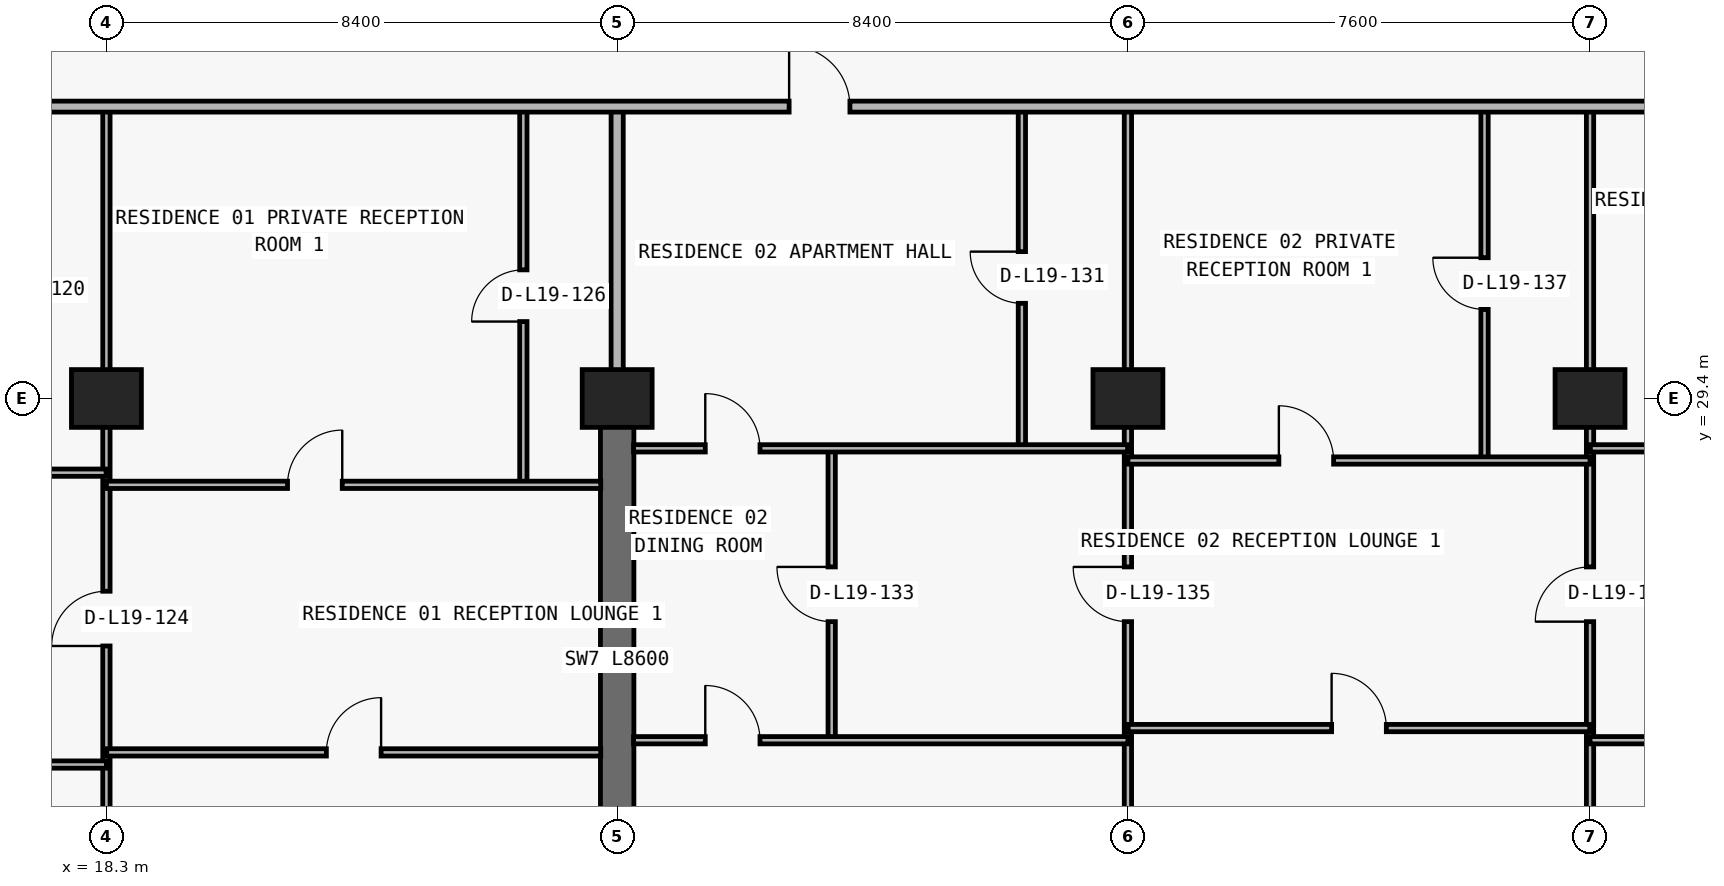
"""IFC4 building model, lengths in metres.
Left out: names, types, materials, properties, quantities, classifications, styles, units other than length and angle.
Written with IfcOpenShell. Run it as: python <this file> out.ifc"""

import sys

from ifc_helpers import new_model, si_unit, direction, frame, frame_2d, origin, origin_2d, place, context, subcontext, project, spatial, rectangle, extrude, element, fill, save


model = new_model("IFC4")
c1 = context("Model", 3, precision=1e-05, world=origin(), true_north=direction((0.0, 1.0)))
c2 = subcontext(c1, "Body", "Model", "MODEL_VIEW")
j1 = project(units=[si_unit("LENGTHUNIT", "METRE"), si_unit("PLANEANGLEUNIT", "RADIAN")], contexts=[c1])
p1 = place(None, origin())
s1 = spatial("IfcSite", under=j1, at=p1, CompositionType="ELEMENT")
p2 = place(p1, origin())
s2 = spatial("IfcBuilding", under=s1, at=p2, CompositionType="ELEMENT")
p3 = place(p2, frame((0.0, 0.0, 72.9)))
s3 = spatial("IfcBuildingStorey", under=s2, at=p3, CompositionType="ELEMENT", Elevation=72.9)
for number, where, z_axis, x_axis in (
    (1, (18.3, 29.4, 0.0), (0.0, 0.0, 1.0), (1.0, 0.0, 0.0)),
    (2, (26.7, 29.4, 0.0), (0.0, 0.0, 1.0), (1.0, 0.0, 0.0)),
    (3, (35.1, 29.4, 0.0), (0.0, 0.0, 1.0), (1.0, 0.0, 0.0)),
    (4, (42.7, 29.4, 0.0), (0.0, 0.0, 1.0), (1.0, 0.0, 0.0)),
):
    element("IfcColumn", number, at=place(p3, frame(where, z_axis=z_axis, x_axis=x_axis)), inside=s3, PredefinedType="COLUMN", context=c2, shape_type="SweptSolid", body=[
        extrude(rectangle(XDim=1.15, YDim=0.95, at=origin_2d()), origin(), (0.0, 0.0, 1.0), 3.05),
    ])
p4 = place(p3, frame((26.7, 20.8, 0.0), z_axis=(0.0, 0.0, 1.0), x_axis=(0.0, 1.0, 0.0)))
e5 = element("IfcWall", 5, at=p4, inside=s3, PredefinedType="SHEAR", context=c2, shape_type="SweptSolid", body=[
    extrude(rectangle(XDim=8.6, YDim=0.55, at=frame_2d((4.3, 0.0))), origin(), (0.0, 0.0, 1.0), 3.05),
])
p5 = place(p3, frame((18.3, 6.24, 0.0), z_axis=(0.0, 0.0, 1.0), x_axis=(0.0, 1.0, 0.0)))
e6 = element("IfcWall", 6, at=p5, inside=s3, PredefinedType="PARTITIONING", context=c2, shape_type="SweptSolid", body=[
    extrude(rectangle(XDim=27.96, YDim=0.12, at=frame_2d((13.98, 0.0))), origin(), (0.0, 0.0, 1.0), 2.11),
])
p6 = place(p5, frame((19.09, 0.0, 0.0)))
e7 = element("IfcOpeningElement", 7, at=p6, cuts=e6, PredefinedType="OPENING", context=c2, shape_type="SweptSolid", body=[
    extrude(rectangle(XDim=0.9, YDim=2.06, at=frame_2d((0.45, 1.03))), frame((0.0, 0.07, 0.0), z_axis=(0.0, -1.0, 0.0), x_axis=(1.0, 0.0, 0.0)), (0.0, 0.0, 1.0), 0.14),
])
p7 = place(p3, frame((25.157, 27.98, 0.0), z_axis=(0.0, 0.0, 1.0), x_axis=(0.0, 1.0, 0.0)))
e8 = element("IfcWall", 8, at=p7, inside=s3, PredefinedType="PARTITIONING", context=c2, shape_type="SweptSolid", body=[
    extrude(rectangle(XDim=6.22, YDim=0.12, at=frame_2d((3.11, 0.0))), origin(), (0.0, 0.0, 1.0), 3.05),
])
p8 = place(p7, frame((2.685, 0.0, 0.0)))
e9 = element("IfcOpeningElement", 9, at=p8, cuts=e8, PredefinedType="OPENING", context=c2, shape_type="SweptSolid", body=[
    extrude(rectangle(XDim=0.85, YDim=2.1, at=frame_2d((0.425, 1.05))), frame((0.0, 0.07, 0.0), z_axis=(0.0, -1.0, 0.0), x_axis=(1.0, 0.0, 0.0)), (0.0, 0.0, 1.0), 0.14),
])
p9 = place(p3, frame((26.7, 29.405, 0.0), z_axis=(0.0, 0.0, 1.0), x_axis=(0.0, 1.0, 0.0)))
e10 = element("IfcWall", 10, at=p9, inside=s3, PredefinedType="PARTITIONING", context=c2, shape_type="SweptSolid", body=[
    extrude(rectangle(XDim=4.795, YDim=0.2, at=frame_2d((2.397, 0.0))), origin(), (0.0, 0.0, 1.0), 2.335),
])
p10 = place(p3, frame((30.228, 23.78, 0.0), z_axis=(0.0, 0.0, 1.0), x_axis=(0.0, 1.0, 0.0)))
e11 = element("IfcWall", 11, at=p10, inside=s3, PredefinedType="PARTITIONING", context=c2, shape_type="SweptSolid", body=[
    extrude(rectangle(XDim=4.8, YDim=0.12, at=frame_2d((2.4, 0.0))), origin(), (0.0, 0.0, 1.0), 3.05),
])
p11 = place(p10, frame((1.95, 0.0, 0.0)))
e12 = element("IfcOpeningElement", 12, at=p11, cuts=e11, PredefinedType="OPENING", context=c2, shape_type="SweptSolid", body=[
    extrude(rectangle(XDim=0.9, YDim=2.15, at=frame_2d((0.45, 1.075))), frame((0.0, 0.07, 0.0), z_axis=(0.0, -1.0, 0.0), x_axis=(1.0, 0.0, 0.0)), (0.0, 0.0, 1.0), 0.14),
])
p12 = place(p3, frame((33.356, 28.58, 0.0), z_axis=(0.0, 0.0, 1.0), x_axis=(0.0, 1.0, 0.0)))
e13 = element("IfcWall", 13, at=p12, inside=s3, PredefinedType="PARTITIONING", context=c2, shape_type="SweptSolid", body=[
    extrude(rectangle(XDim=5.62, YDim=0.12, at=frame_2d((2.81, 0.0))), origin(), (0.0, 0.0, 1.0), 3.05),
])
p13 = place(p12, frame((2.385, 0.0, 0.0)))
e14 = element("IfcOpeningElement", 14, at=p13, cuts=e13, PredefinedType="OPENING", context=c2, shape_type="SweptSolid", body=[
    extrude(rectangle(XDim=0.85, YDim=2.1, at=frame_2d((0.425, 1.05))), frame((0.0, 0.07, 0.0), z_axis=(0.0, -1.0, 0.0), x_axis=(1.0, 0.0, 0.0)), (0.0, 0.0, 1.0), 0.14),
])
p14 = place(p3, frame((35.1, 6.24, 0.0), z_axis=(0.0, 0.0, 1.0), x_axis=(0.0, 1.0, 0.0)))
e15 = element("IfcWall", 15, at=p14, inside=s3, PredefinedType="PARTITIONING", context=c2, shape_type="SweptSolid", body=[
    extrude(rectangle(XDim=27.96, YDim=0.12, at=frame_2d((13.98, 0.0))), origin(), (0.0, 0.0, 1.0), 2.11),
])
p15 = place(p14, frame((19.49, 0.0, 0.0)))
e16 = element("IfcOpeningElement", 16, at=p15, cuts=e15, PredefinedType="OPENING", context=c2, shape_type="SweptSolid", body=[
    extrude(rectangle(XDim=0.9, YDim=2.06, at=frame_2d((0.45, 1.03))), frame((0.0, 0.07, 0.0), z_axis=(0.0, -1.0, 0.0), x_axis=(1.0, 0.0, 0.0)), (0.0, 0.0, 1.0), 0.14),
])
p16 = place(p3, frame((40.965, 28.38, 0.0), z_axis=(0.0, 0.0, 1.0), x_axis=(0.0, 1.0, 0.0)))
e17 = element("IfcWall", 17, at=p16, inside=s3, PredefinedType="PARTITIONING", context=c2, shape_type="SweptSolid", body=[
    extrude(rectangle(XDim=5.82, YDim=0.12, at=frame_2d((2.91, 0.0))), origin(), (0.0, 0.0, 1.0), 3.05),
])
p17 = place(p16, frame((2.485, 0.0, 0.0)))
e18 = element("IfcOpeningElement", 18, at=p17, cuts=e17, PredefinedType="OPENING", context=c2, shape_type="SweptSolid", body=[
    extrude(rectangle(XDim=0.85, YDim=2.1, at=frame_2d((0.425, 1.05))), frame((0.0, 0.07, 0.0), z_axis=(0.0, -1.0, 0.0), x_axis=(1.0, 0.0, 0.0)), (0.0, 0.0, 1.0), 0.14),
])
p18 = place(p3, frame((42.7, 6.24, 0.0), z_axis=(0.0, 0.0, 1.0), x_axis=(0.0, 1.0, 0.0)))
e19 = element("IfcWall", 19, at=p18, inside=s3, PredefinedType="PARTITIONING", context=c2, shape_type="SweptSolid", body=[
    extrude(rectangle(XDim=27.96, YDim=0.12, at=frame_2d((13.98, 0.0))), origin(), (0.0, 0.0, 1.0), 2.11),
])
p19 = place(p18, frame((19.49, 0.0, 0.0)))
e20 = element("IfcOpeningElement", 20, at=p19, cuts=e19, PredefinedType="OPENING", context=c2, shape_type="SweptSolid", body=[
    extrude(rectangle(XDim=0.9, YDim=2.06, at=frame_2d((0.45, 1.03))), frame((0.0, 0.07, 0.0), z_axis=(0.0, -1.0, 0.0), x_axis=(1.0, 0.0, 0.0)), (0.0, 0.0, 1.0), 0.14),
])
p20 = place(p3, frame((9.9, 23.38, 0.0), z_axis=(0.0, 0.0, 1.0), x_axis=(1.0, 0.0, 0.0)))
e21 = element("IfcWall", 21, at=p20, inside=s3, PredefinedType="PARTITIONING", context=c2, shape_type="SweptSolid", body=[
    extrude(rectangle(XDim=8.4, YDim=0.12, at=frame_2d((4.2, 0.0))), origin(), (0.0, 0.0, 1.0), 3.05),
])
p21 = place(p20, frame((1.44, 0.0, 0.0)))
e22 = element("IfcOpeningElement", 22, at=p21, cuts=e21, PredefinedType="OPENING", context=c2, shape_type="SweptSolid", body=[
    extrude(rectangle(XDim=0.9, YDim=2.15, at=frame_2d((0.45, 1.075))), frame((0.0, 0.07, 0.0), z_axis=(0.0, -1.0, 0.0), x_axis=(1.0, 0.0, 0.0)), (0.0, 0.0, 1.0), 0.14),
])
p22 = place(p3, frame((18.305, 23.58, 0.0), z_axis=(0.0, 0.0, 1.0), x_axis=(1.0, 0.0, 0.0)))
e23 = element("IfcWall", 23, at=p22, inside=s3, PredefinedType="PARTITIONING", context=c2, shape_type="SweptSolid", body=[
    extrude(rectangle(XDim=8.125, YDim=0.12, at=frame_2d((4.062, 0.0))), origin(), (0.0, 0.0, 1.0), 3.05),
])
p23 = place(p22, frame((3.613, 0.0, 0.0)))
e24 = element("IfcOpeningElement", 24, at=p23, cuts=e23, PredefinedType="OPENING", context=c2, shape_type="SweptSolid", body=[
    extrude(rectangle(XDim=0.9, YDim=2.15, at=frame_2d((0.45, 1.075))), frame((0.0, 0.07, 0.0), z_axis=(0.0, -1.0, 0.0), x_axis=(1.0, 0.0, 0.0)), (0.0, 0.0, 1.0), 0.14),
])
p24 = place(p3, frame((26.97, 23.78, 0.0), z_axis=(0.0, 0.0, 1.0), x_axis=(1.0, 0.0, 0.0)))
e25 = element("IfcWall", 25, at=p24, inside=s3, PredefinedType="PARTITIONING", context=c2, shape_type="SweptSolid", body=[
    extrude(rectangle(XDim=8.13, YDim=0.12, at=frame_2d((4.065, 0.0))), origin(), (0.0, 0.0, 1.0), 3.05),
])
p25 = place(p24, frame((1.179, 0.0, 0.0)))
e26 = element("IfcOpeningElement", 26, at=p25, cuts=e25, PredefinedType="OPENING", context=c2, shape_type="SweptSolid", body=[
    extrude(rectangle(XDim=0.9, YDim=2.15, at=frame_2d((0.45, 1.075))), frame((0.0, 0.07, 0.0), z_axis=(0.0, -1.0, 0.0), x_axis=(1.0, 0.0, 0.0)), (0.0, 0.0, 1.0), 0.14),
])
p26 = place(p3, frame((42.7, 23.78, 0.0), z_axis=(0.0, 0.0, 1.0), x_axis=(1.0, 0.0, 0.0)))
e27 = element("IfcWall", 27, at=p26, inside=s3, PredefinedType="PARTITIONING", context=c2, shape_type="SweptSolid", body=[
    extrude(rectangle(XDim=8.13, YDim=0.12, at=frame_2d((4.065, 0.0))), origin(), (0.0, 0.0, 1.0), 3.05),
])
p27 = place(p26, frame((3.615, 0.0, 0.0)))
e28 = element("IfcOpeningElement", 28, at=p27, cuts=e27, PredefinedType="OPENING", context=c2, shape_type="SweptSolid", body=[
    extrude(rectangle(XDim=0.9, YDim=2.15, at=frame_2d((0.45, 1.075))), frame((0.0, 0.07, 0.0), z_axis=(0.0, -1.0, 0.0), x_axis=(1.0, 0.0, 0.0)), (0.0, 0.0, 1.0), 0.14),
])
p28 = place(p3, frame((35.105, 23.98, 0.0), z_axis=(0.0, 0.0, 1.0), x_axis=(1.0, 0.0, 0.0)))
e29 = element("IfcWall", 29, at=p28, inside=s3, PredefinedType="PARTITIONING", context=c2, shape_type="SweptSolid", body=[
    extrude(rectangle(XDim=7.59, YDim=0.12, at=frame_2d((3.795, 0.0))), origin(), (0.0, 0.0, 1.0), 3.05),
])
p29 = place(p28, frame((3.345, 0.0, 0.0)))
e30 = element("IfcOpeningElement", 30, at=p29, cuts=e29, PredefinedType="OPENING", context=c2, shape_type="SweptSolid", body=[
    extrude(rectangle(XDim=0.9, YDim=2.15, at=frame_2d((0.45, 1.075))), frame((0.0, 0.07, 0.0), z_axis=(0.0, -1.0, 0.0), x_axis=(1.0, 0.0, 0.0)), (0.0, 0.0, 1.0), 0.14),
])
p30 = place(p3, frame((18.3, 27.98, 0.0), z_axis=(0.0, 0.0, 1.0), x_axis=(1.0, 0.0, 0.0)))
e31 = element("IfcWall", 31, at=p30, inside=s3, PredefinedType="PARTITIONING", context=c2, shape_type="SweptSolid", body=[
    extrude(rectangle(XDim=8.13, YDim=0.12, at=frame_2d((4.065, 0.0))), origin(), (0.0, 0.0, 1.0), 3.05),
])
p31 = place(p30, frame((2.979, 0.0, 0.0)))
e32 = element("IfcOpeningElement", 32, at=p31, cuts=e31, PredefinedType="OPENING", context=c2, shape_type="SweptSolid", body=[
    extrude(rectangle(XDim=0.9, YDim=2.15, at=frame_2d((0.45, 1.075))), frame((0.0, 0.07, 0.0), z_axis=(0.0, -1.0, 0.0), x_axis=(1.0, 0.0, 0.0)), (0.0, 0.0, 1.0), 0.14),
])
p32 = place(p3, frame((9.9, 28.18, 0.0), z_axis=(0.0, 0.0, 1.0), x_axis=(1.0, 0.0, 0.0)))
e33 = element("IfcWall", 33, at=p32, inside=s3, PredefinedType="PARTITIONING", context=c2, shape_type="SweptSolid", body=[
    extrude(rectangle(XDim=8.395, YDim=0.12, at=frame_2d((4.198, 0.0))), origin(), (0.0, 0.0, 1.0), 3.05),
])
p33 = place(p32, frame((1.44, 0.0, 0.0)))
e34 = element("IfcOpeningElement", 34, at=p33, cuts=e33, PredefinedType="OPENING", context=c2, shape_type="SweptSolid", body=[
    extrude(rectangle(XDim=0.9, YDim=2.15, at=frame_2d((0.45, 1.075))), frame((0.0, 0.07, 0.0), z_axis=(0.0, -1.0, 0.0), x_axis=(1.0, 0.0, 0.0)), (0.0, 0.0, 1.0), 0.14),
])
p34 = place(p3, frame((35.1, 28.38, 0.0), z_axis=(0.0, 0.0, 1.0), x_axis=(1.0, 0.0, 0.0)))
e35 = element("IfcWall", 35, at=p34, inside=s3, PredefinedType="PARTITIONING", context=c2, shape_type="SweptSolid", body=[
    extrude(rectangle(XDim=7.6, YDim=0.12, at=frame_2d((3.8, 0.0))), origin(), (0.0, 0.0, 1.0), 3.05),
])
p35 = place(p34, frame((2.482, 0.0, 0.0)))
e36 = element("IfcOpeningElement", 36, at=p35, cuts=e35, PredefinedType="OPENING", context=c2, shape_type="SweptSolid", body=[
    extrude(rectangle(XDim=0.9, YDim=2.15, at=frame_2d((0.45, 1.075))), frame((0.0, 0.07, 0.0), z_axis=(0.0, -1.0, 0.0), x_axis=(1.0, 0.0, 0.0)), (0.0, 0.0, 1.0), 0.14),
])
p36 = place(p3, frame((26.97, 28.58, 0.0), z_axis=(0.0, 0.0, 1.0), x_axis=(1.0, 0.0, 0.0)))
e37 = element("IfcWall", 37, at=p36, inside=s3, PredefinedType="PARTITIONING", context=c2, shape_type="SweptSolid", body=[
    extrude(rectangle(XDim=8.125, YDim=0.12, at=frame_2d((4.062, 0.0))), origin(), (0.0, 0.0, 1.0), 3.05),
])
p37 = place(p36, frame((1.179, 0.0, 0.0)))
e38 = element("IfcOpeningElement", 38, at=p37, cuts=e37, PredefinedType="OPENING", context=c2, shape_type="SweptSolid", body=[
    extrude(rectangle(XDim=0.9, YDim=2.15, at=frame_2d((0.45, 1.075))), frame((0.0, 0.07, 0.0), z_axis=(0.0, -1.0, 0.0), x_axis=(1.0, 0.0, 0.0)), (0.0, 0.0, 1.0), 0.14),
])
p38 = place(p3, frame((42.705, 28.58, 0.0), z_axis=(0.0, 0.0, 1.0), x_axis=(1.0, 0.0, 0.0)))
e39 = element("IfcWall", 39, at=p38, inside=s3, PredefinedType="PARTITIONING", context=c2, shape_type="SweptSolid", body=[
    extrude(rectangle(XDim=8.125, YDim=0.12, at=frame_2d((4.062, 0.0))), origin(), (0.0, 0.0, 1.0), 3.05),
])
p39 = place(p38, frame((2.894, 0.0, 0.0)))
e40 = element("IfcOpeningElement", 40, at=p39, cuts=e39, PredefinedType="OPENING", context=c2, shape_type="SweptSolid", body=[
    extrude(rectangle(XDim=0.9, YDim=2.15, at=frame_2d((0.45, 1.075))), frame((0.0, 0.07, 0.0), z_axis=(0.0, -1.0, 0.0), x_axis=(1.0, 0.0, 0.0)), (0.0, 0.0, 1.0), 0.14),
])
p40 = place(p3, frame((5.105, 34.2, 0.0), z_axis=(0.0, 0.0, 1.0), x_axis=(1.0, 0.0, 0.0)))
e41 = element("IfcWall", 41, at=p40, inside=s3, PredefinedType="PARTITIONING", context=c2, shape_type="SweptSolid", body=[
    extrude(rectangle(XDim=67.595, YDim=0.18, at=frame_2d((33.797, 0.0))), origin(), (0.0, 0.0, 1.0), 3.05),
])
p41 = place(p40, frame((7.639, 0.0, 0.0)))
e42 = element("IfcOpeningElement", 42, at=p41, cuts=e41, PredefinedType="OPENING", context=c2, shape_type="SweptSolid", body=[
    extrude(rectangle(XDim=1.0, YDim=2.2, at=frame_2d((0.5, 1.1))), frame((0.0, 0.1, 0.0), z_axis=(0.0, -1.0, 0.0), x_axis=(1.0, 0.0, 0.0)), (0.0, 0.0, 1.0), 0.2),
])
p42 = place(p40, frame((24.423, 0.0, 0.0)))
e43 = element("IfcOpeningElement", 43, at=p42, cuts=e41, PredefinedType="OPENING", context=c2, shape_type="SweptSolid", body=[
    extrude(rectangle(XDim=1.0, YDim=2.2, at=frame_2d((0.5, 1.1))), frame((0.0, 0.1, 0.0), z_axis=(0.0, -1.0, 0.0), x_axis=(1.0, 0.0, 0.0)), (0.0, 0.0, 1.0), 0.2),
])
p43 = place(p40, frame((48.825, 0.0, 0.0)))
e44 = element("IfcOpeningElement", 44, at=p43, cuts=e41, PredefinedType="OPENING", context=c2, shape_type="SweptSolid", body=[
    extrude(rectangle(XDim=1.0, YDim=2.2, at=frame_2d((0.5, 1.1))), frame((0.0, 0.1, 0.0), z_axis=(0.0, -1.0, 0.0), x_axis=(1.0, 0.0, 0.0)), (0.0, 0.0, 1.0), 0.2),
])
p44 = place(p6, origin())
e45 = element("IfcDoor", 45, at=p44, inside=s3, OperationType="SINGLE_SWING_LEFT", PredefinedType="DOOR", context=c2, shape_type="SweptSolid", body=[
    extrude(rectangle(XDim=0.9, YDim=2.06, at=frame_2d((0.45, 1.03))), frame((0.0, 0.025, 0.0), z_axis=(0.0, -1.0, 0.0), x_axis=(1.0, 0.0, 0.0)), (0.0, 0.0, 1.0), 0.05),
])
fill(e7, e45)
p45 = place(p31, origin())
e46 = element("IfcDoor", 46, at=p45, inside=s3, OperationType="SINGLE_SWING_RIGHT", PredefinedType="DOOR", context=c2, shape_type="SweptSolid", body=[
    extrude(rectangle(XDim=0.9, YDim=2.15, at=frame_2d((0.45, 1.075))), frame((0.0, 0.025, 0.0), z_axis=(0.0, -1.0, 0.0), x_axis=(1.0, 0.0, 0.0)), (0.0, 0.0, 1.0), 0.05),
])
fill(e32, e46)
p46 = place(p8, origin())
e47 = element("IfcDoor", 47, at=p46, inside=s3, OperationType="SINGLE_SWING_LEFT", PredefinedType="DOOR", context=c2, shape_type="SweptSolid", body=[
    extrude(rectangle(XDim=0.85, YDim=2.1, at=frame_2d((0.425, 1.05))), frame((0.0, 0.025, 0.0), z_axis=(0.0, -1.0, 0.0), x_axis=(1.0, 0.0, 0.0)), (0.0, 0.0, 1.0), 0.05),
])
fill(e9, e47)
p47 = place(p23, origin())
e48 = element("IfcDoor", 48, at=p47, inside=s3, OperationType="SINGLE_SWING_RIGHT", PredefinedType="DOOR", context=c2, shape_type="SweptSolid", body=[
    extrude(rectangle(XDim=0.9, YDim=2.15, at=frame_2d((0.45, 1.075))), frame((0.0, 0.025, 0.0), z_axis=(0.0, -1.0, 0.0), x_axis=(1.0, 0.0, 0.0)), (0.0, 0.0, 1.0), 0.05),
])
fill(e24, e48)
p48 = place(p42, origin())
e49 = element("IfcDoor", 49, at=p48, inside=s3, OperationType="SINGLE_SWING_LEFT", PredefinedType="DOOR", context=c2, shape_type="SweptSolid", body=[
    extrude(rectangle(XDim=1.0, YDim=2.2, at=frame_2d((0.5, 1.1))), frame((0.0, 0.025, 0.0), z_axis=(0.0, -1.0, 0.0), x_axis=(1.0, 0.0, 0.0)), (0.0, 0.0, 1.0), 0.05),
])
fill(e43, e49)
p49 = place(p13, origin())
e50 = element("IfcDoor", 50, at=p49, inside=s3, OperationType="SINGLE_SWING_RIGHT", PredefinedType="DOOR", context=c2, shape_type="SweptSolid", body=[
    extrude(rectangle(XDim=0.85, YDim=2.1, at=frame_2d((0.425, 1.05))), frame((0.0, 0.025, 0.0), z_axis=(0.0, -1.0, 0.0), x_axis=(1.0, 0.0, 0.0)), (0.0, 0.0, 1.0), 0.05),
])
fill(e14, e50)
p50 = place(p37, origin())
e51 = element("IfcDoor", 51, at=p50, inside=s3, OperationType="SINGLE_SWING_LEFT", PredefinedType="DOOR", context=c2, shape_type="SweptSolid", body=[
    extrude(rectangle(XDim=0.9, YDim=2.15, at=frame_2d((0.45, 1.075))), frame((0.0, 0.025, 0.0), z_axis=(0.0, -1.0, 0.0), x_axis=(1.0, 0.0, 0.0)), (0.0, 0.0, 1.0), 0.05),
])
fill(e38, e51)
p51 = place(p11, origin())
e52 = element("IfcDoor", 52, at=p51, inside=s3, OperationType="SINGLE_SWING_RIGHT", PredefinedType="DOOR", context=c2, shape_type="SweptSolid", body=[
    extrude(rectangle(XDim=0.9, YDim=2.15, at=frame_2d((0.45, 1.075))), frame((0.0, 0.025, 0.0), z_axis=(0.0, -1.0, 0.0), x_axis=(1.0, 0.0, 0.0)), (0.0, 0.0, 1.0), 0.05),
])
fill(e12, e52)
p52 = place(p25, origin())
e53 = element("IfcDoor", 53, at=p52, inside=s3, OperationType="SINGLE_SWING_LEFT", PredefinedType="DOOR", context=c2, shape_type="SweptSolid", body=[
    extrude(rectangle(XDim=0.9, YDim=2.15, at=frame_2d((0.45, 1.075))), frame((0.0, 0.025, 0.0), z_axis=(0.0, -1.0, 0.0), x_axis=(1.0, 0.0, 0.0)), (0.0, 0.0, 1.0), 0.05),
])
fill(e26, e53)
p53 = place(p15, origin())
e54 = element("IfcDoor", 54, at=p53, inside=s3, OperationType="SINGLE_SWING_RIGHT", PredefinedType="DOOR", context=c2, shape_type="SweptSolid", body=[
    extrude(rectangle(XDim=0.9, YDim=2.06, at=frame_2d((0.45, 1.03))), frame((0.0, 0.025, 0.0), z_axis=(0.0, -1.0, 0.0), x_axis=(1.0, 0.0, 0.0)), (0.0, 0.0, 1.0), 0.05),
])
fill(e16, e54)
p54 = place(p35, origin())
e55 = element("IfcDoor", 55, at=p54, inside=s3, OperationType="SINGLE_SWING_LEFT", PredefinedType="DOOR", context=c2, shape_type="SweptSolid", body=[
    extrude(rectangle(XDim=0.9, YDim=2.15, at=frame_2d((0.45, 1.075))), frame((0.0, 0.025, 0.0), z_axis=(0.0, -1.0, 0.0), x_axis=(1.0, 0.0, 0.0)), (0.0, 0.0, 1.0), 0.05),
])
fill(e36, e55)
p55 = place(p17, origin())
e56 = element("IfcDoor", 56, at=p55, inside=s3, OperationType="SINGLE_SWING_RIGHT", PredefinedType="DOOR", context=c2, shape_type="SweptSolid", body=[
    extrude(rectangle(XDim=0.85, YDim=2.1, at=frame_2d((0.425, 1.05))), frame((0.0, 0.025, 0.0), z_axis=(0.0, -1.0, 0.0), x_axis=(1.0, 0.0, 0.0)), (0.0, 0.0, 1.0), 0.05),
])
fill(e18, e56)
p56 = place(p29, origin())
e57 = element("IfcDoor", 57, at=p56, inside=s3, OperationType="SINGLE_SWING_LEFT", PredefinedType="DOOR", context=c2, shape_type="SweptSolid", body=[
    extrude(rectangle(XDim=0.9, YDim=2.15, at=frame_2d((0.45, 1.075))), frame((0.0, 0.025, 0.0), z_axis=(0.0, -1.0, 0.0), x_axis=(1.0, 0.0, 0.0)), (0.0, 0.0, 1.0), 0.05),
])
fill(e30, e57)
p57 = place(p19, origin())
e58 = element("IfcDoor", 58, at=p57, inside=s3, OperationType="SINGLE_SWING_LEFT", PredefinedType="DOOR", context=c2, shape_type="SweptSolid", body=[
    extrude(rectangle(XDim=0.9, YDim=2.06, at=frame_2d((0.45, 1.03))), frame((0.0, 0.025, 0.0), z_axis=(0.0, -1.0, 0.0), x_axis=(1.0, 0.0, 0.0)), (0.0, 0.0, 1.0), 0.05),
])
fill(e20, e58)
save(model, sys.argv[1])
